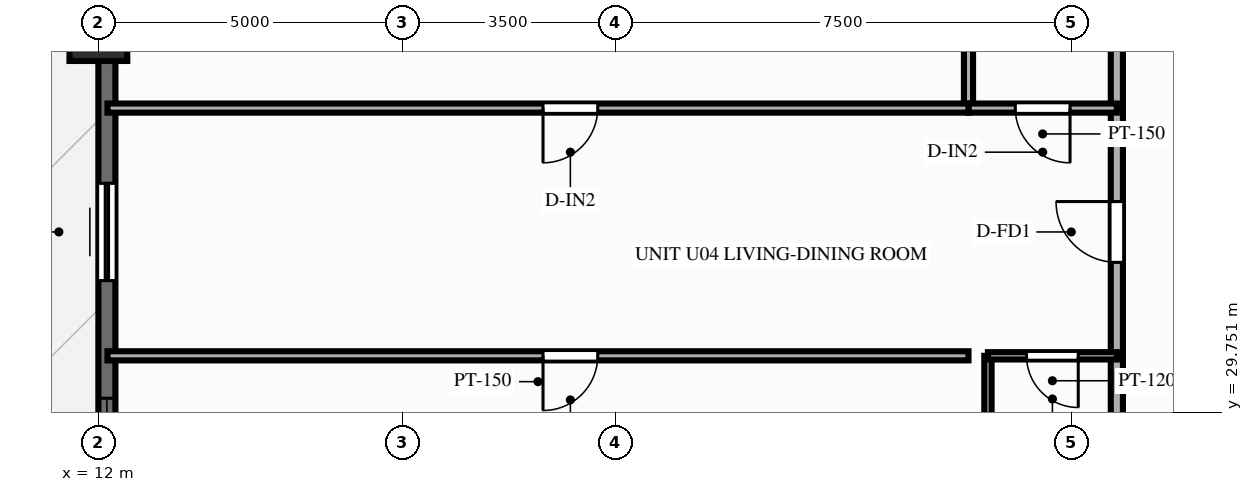
"""IFC4 building model, lengths in metres.
Left out: names, types, materials, properties, quantities, classifications, styles, units other than length and angle.
Written with IfcOpenShell. Run it as: python <this file> out.ifc"""

import sys

from ifc_helpers import new_model, si_unit, direction, frame, frame_2d, origin, origin_2d, place, context, subcontext, project, spatial, rectangle, extrude, source, transform, mapped, element, fill, save


model = new_model("IFC4")
c1 = context("Model", 3, precision=1e-05, world=origin(), true_north=direction((0.0, 1.0)))
c2 = subcontext(c1, "Body", "Model", "MODEL_VIEW")
j1 = project(units=[si_unit("LENGTHUNIT", "METRE"), si_unit("PLANEANGLEUNIT", "RADIAN")], contexts=[c1])
p1 = place(None, origin())
s1 = spatial("IfcSite", under=j1, at=p1, CompositionType="ELEMENT")
p2 = place(p1, origin())
s2 = spatial("IfcBuilding", under=s1, at=p2, CompositionType="ELEMENT")
p3 = place(p2, frame((0.0, 0.0, 141.75)))
s3 = spatial("IfcBuildingStorey", under=s2, at=p3, CompositionType="ELEMENT", Elevation=141.75)
m1 = source(origin(), c2, "Body", "SweptSolid", [
    extrude(rectangle(XDim=0.95, YDim=0.95, at=origin_2d()), origin(), (0.0, 0.0, 1.0), 3.0),
])
p4 = place(p3, frame((12.0, 36.0, 0.0), z_axis=(0.0, 0.0, 1.0), x_axis=(1.0, 0.0, 0.0)))
e1 = element("IfcColumn", 1, at=p4, inside=s3, PredefinedType="COLUMN", context=c2, shape_type="MappedRepresentation", body=[
    mapped(m1, transform((0.0, 0.0, 0.0), scale=1.0)),
])
p5 = place(p3, frame((12.14, 7.2, 0.0), z_axis=(0.0, 0.0, 1.0), x_axis=(0.0, 1.0, 0.0)))
e2 = element("IfcWall", 2, at=p5, inside=s3, PredefinedType="SOLIDWALL", context=c2, shape_type="SweptSolid", body=[
    extrude(rectangle(XDim=39.6, YDim=0.28, at=frame_2d((19.8, 0.0))), origin(), (0.0, 0.0, 1.0), 2.28),
])
p6 = place(p5, frame((0.945, 0.0, 0.25)))
e3 = element("IfcOpeningElement", 3, at=p6, cuts=e2, PredefinedType="OPENING", context=c2, shape_type="SweptSolid", body=[
    extrude(rectangle(XDim=1.2, YDim=1.5, at=frame_2d((0.6, 0.75))), frame((0.0, 0.152, 0.0), z_axis=(0.0, -1.0, 0.0), x_axis=(1.0, 0.0, 0.0)), (0.0, 0.0, 1.0), 0.304),
])
p7 = place(p5, frame((4.213, 0.0, 0.25)))
e4 = element("IfcOpeningElement", 4, at=p7, cuts=e2, PredefinedType="OPENING", context=c2, shape_type="SweptSolid", body=[
    extrude(rectangle(XDim=1.2, YDim=1.5, at=frame_2d((0.6, 0.75))), frame((0.0, 0.152, 0.0), z_axis=(0.0, -1.0, 0.0), x_axis=(1.0, 0.0, 0.0)), (0.0, 0.0, 1.0), 0.304),
])
p8 = place(p5, frame((7.55, 0.0, 0.25)))
e5 = element("IfcOpeningElement", 5, at=p8, cuts=e2, PredefinedType="OPENING", context=c2, shape_type="SweptSolid", body=[
    extrude(rectangle(XDim=1.2, YDim=1.5, at=frame_2d((0.6, 0.75))), frame((0.0, 0.152, 0.0), z_axis=(0.0, -1.0, 0.0), x_axis=(1.0, 0.0, 0.0)), (0.0, 0.0, 1.0), 0.304),
])
p9 = place(p5, frame((13.483, 0.0, 0.25)))
e6 = element("IfcOpeningElement", 6, at=p9, cuts=e2, PredefinedType="OPENING", context=c2, shape_type="SweptSolid", body=[
    extrude(rectangle(XDim=1.2, YDim=1.5, at=frame_2d((0.6, 0.75))), frame((0.0, 0.152, 0.0), z_axis=(0.0, -1.0, 0.0), x_axis=(1.0, 0.0, 0.0)), (0.0, 0.0, 1.0), 0.304),
])
p10 = place(p5, frame((16.82, 0.0, 0.25)))
e7 = element("IfcOpeningElement", 7, at=p10, cuts=e2, PredefinedType="OPENING", context=c2, shape_type="SweptSolid", body=[
    extrude(rectangle(XDim=1.2, YDim=1.5, at=frame_2d((0.6, 0.75))), frame((0.0, 0.152, 0.0), z_axis=(0.0, -1.0, 0.0), x_axis=(1.0, 0.0, 0.0)), (0.0, 0.0, 1.0), 0.304),
])
p11 = place(p5, frame((19.2, 0.0, 0.25)))
e8 = element("IfcOpeningElement", 8, at=p11, cuts=e2, PredefinedType="OPENING", context=c2, shape_type="SweptSolid", body=[
    extrude(rectangle(XDim=1.2, YDim=1.5, at=frame_2d((0.6, 0.75))), frame((0.0, 0.152, 0.0), z_axis=(0.0, -1.0, 0.0), x_axis=(1.0, 0.0, 0.0)), (0.0, 0.0, 1.0), 0.304),
])
p12 = place(p5, frame((21.578, 0.0, 0.25)))
e9 = element("IfcOpeningElement", 9, at=p12, cuts=e2, PredefinedType="OPENING", context=c2, shape_type="SweptSolid", body=[
    extrude(rectangle(XDim=1.2, YDim=1.5, at=frame_2d((0.6, 0.75))), frame((0.0, 0.152, 0.0), z_axis=(0.0, -1.0, 0.0), x_axis=(1.0, 0.0, 0.0)), (0.0, 0.0, 1.0), 0.304),
])
p13 = place(p5, frame((24.713, 0.0, 0.0)))
e10 = element("IfcOpeningElement", 10, at=p13, cuts=e2, PredefinedType="OPENING", context=c2, shape_type="SweptSolid", body=[
    extrude(rectangle(XDim=1.6, YDim=2.15, at=frame_2d((0.8, 1.075))), frame((0.0, 0.152, 0.0), z_axis=(0.0, -1.0, 0.0), x_axis=(1.0, 0.0, 0.0)), (0.0, 0.0, 1.0), 0.304),
])
p14 = place(p5, frame((29.305, 0.0, 0.25)))
e11 = element("IfcOpeningElement", 11, at=p14, cuts=e2, PredefinedType="OPENING", context=c2, shape_type="SweptSolid", body=[
    extrude(rectangle(XDim=0.7, YDim=1.5, at=frame_2d((0.35, 0.75))), frame((0.0, 0.152, 0.0), z_axis=(0.0, -1.0, 0.0), x_axis=(1.0, 0.0, 0.0)), (0.0, 0.0, 1.0), 0.304),
])
p15 = place(p5, frame((30.848, 0.0, 0.25)))
e12 = element("IfcOpeningElement", 12, at=p15, cuts=e2, PredefinedType="OPENING", context=c2, shape_type="SweptSolid", body=[
    extrude(rectangle(XDim=1.2, YDim=1.5, at=frame_2d((0.6, 0.75))), frame((0.0, 0.152, 0.0), z_axis=(0.0, -1.0, 0.0), x_axis=(1.0, 0.0, 0.0)), (0.0, 0.0, 1.0), 0.304),
])
p16 = place(p5, frame((34.183, 0.0, 0.25)))
e13 = element("IfcOpeningElement", 13, at=p16, cuts=e2, PredefinedType="OPENING", context=c2, shape_type="SweptSolid", body=[
    extrude(rectangle(XDim=1.2, YDim=1.5, at=frame_2d((0.6, 0.75))), frame((0.0, 0.152, 0.0), z_axis=(0.0, -1.0, 0.0), x_axis=(1.0, 0.0, 0.0)), (0.0, 0.0, 1.0), 0.304),
])
p17 = place(p5, frame((37.452, 0.0, 0.25)))
e14 = element("IfcOpeningElement", 14, at=p17, cuts=e2, PredefinedType="OPENING", context=c2, shape_type="SweptSolid", body=[
    extrude(rectangle(XDim=1.2, YDim=1.5, at=frame_2d((0.6, 0.75))), frame((0.0, 0.152, 0.0), z_axis=(0.0, -1.0, 0.0), x_axis=(1.0, 0.0, 0.0)), (0.0, 0.0, 1.0), 0.304),
])
p18 = place(p3, frame((28.75, 28.08, 0.0), z_axis=(0.0, 0.0, 1.0), x_axis=(0.0, 1.0, 0.0)))
e15 = element("IfcWall", 15, at=p18, inside=s3, PredefinedType="PARTITIONING", context=c2, shape_type="SweptSolid", body=[
    extrude(rectangle(XDim=2.595, YDim=0.2, at=frame_2d((1.298, 0.0))), origin(), (0.0, 0.0, 1.0), 2.7),
])
p19 = place(p3, frame((28.75, 30.676, 0.0), z_axis=(0.0, 0.0, 1.0), x_axis=(0.0, 1.0, 0.0)))
e16 = element("IfcWall", 16, at=p19, inside=s3, PredefinedType="PARTITIONING", context=c2, shape_type="SweptSolid", body=[
    extrude(rectangle(XDim=4.074, YDim=0.2, at=frame_2d((2.037, 0.0))), origin(), (0.0, 0.0, 1.0), 2.7),
])
p20 = place(p19, frame((1.537, 0.0, 0.0)))
e17 = element("IfcOpeningElement", 17, at=p20, cuts=e16, PredefinedType="OPENING", context=c2, shape_type="SweptSolid", body=[
    extrude(rectangle(XDim=1.0, YDim=2.15, at=frame_2d((0.5, 1.075))), frame((0.0, 0.112, 0.0), z_axis=(0.0, -1.0, 0.0), x_axis=(1.0, 0.0, 0.0)), (0.0, 0.0, 1.0), 0.224),
])
p21 = place(p3, frame((28.75, 34.75, 0.0), z_axis=(0.0, 0.0, 1.0), x_axis=(0.0, 1.0, 0.0)))
e18 = element("IfcWall", 18, at=p21, inside=s3, PredefinedType="PARTITIONING", context=c2, shape_type="SweptSolid", body=[
    extrude(rectangle(XDim=2.6, YDim=0.2, at=frame_2d((1.3, 0.0))), origin(), (0.0, 0.0, 1.0), 2.7),
])
p22 = place(p3, frame((26.63, 28.08, 0.0), z_axis=(0.0, 0.0, 1.0), x_axis=(0.0, 1.0, 0.0)))
e19 = element("IfcWall", 19, at=p22, inside=s3, PredefinedType="PARTITIONING", context=c2, shape_type="SweptSolid", body=[
    extrude(rectangle(XDim=2.595, YDim=0.12, at=frame_2d((1.298, 0.0))), origin(), (0.0, 0.0, 1.0), 2.7),
])
p23 = place(p3, frame((26.31, 34.75, 0.0), z_axis=(0.0, 0.0, 1.0), x_axis=(0.0, 1.0, 0.0)))
e20 = element("IfcWall", 20, at=p23, inside=s3, PredefinedType="PARTITIONING", context=c2, shape_type="SweptSolid", body=[
    extrude(rectangle(XDim=2.6, YDim=0.15, at=frame_2d((1.3, 0.0))), origin(), (0.0, 0.0, 1.0), 2.7),
])
p24 = place(p3, frame((28.75, 30.676, 0.0), z_axis=(0.0, 0.0, 1.0), x_axis=(-1.0, 0.0, 0.0)))
e21 = element("IfcWall", 21, at=p24, inside=s3, PredefinedType="PARTITIONING", context=c2, shape_type="SweptSolid", body=[
    extrude(rectangle(XDim=2.12, YDim=0.12, at=frame_2d((1.06, 0.0))), origin(), (0.0, 0.0, 1.0), 2.7),
])
p25 = place(p24, frame((0.635, 0.0, 0.0)))
e22 = element("IfcOpeningElement", 22, at=p25, cuts=e21, PredefinedType="OPENING", context=c2, shape_type="SweptSolid", body=[
    extrude(rectangle(XDim=0.85, YDim=2.05, at=frame_2d((0.425, 1.025))), frame((0.0, 0.072, 0.0), z_axis=(0.0, -1.0, 0.0), x_axis=(1.0, 0.0, 0.0)), (0.0, 0.0, 1.0), 0.144),
])
p26 = place(p3, frame((26.31, 30.676, 0.0), z_axis=(0.0, 0.0, 1.0), x_axis=(-1.0, 0.0, 0.0)))
e23 = element("IfcWall", 23, at=p26, inside=s3, PredefinedType="PARTITIONING", context=c2, shape_type="SweptSolid", body=[
    extrude(rectangle(XDim=14.16, YDim=0.15, at=frame_2d((7.08, 0.0))), origin(), (0.0, 0.0, 1.0), 2.7),
])
p27 = place(p26, frame((6.097, 0.0, 0.0)))
e24 = element("IfcOpeningElement", 24, at=p27, cuts=e23, PredefinedType="OPENING", context=c2, shape_type="SweptSolid", body=[
    extrude(rectangle(XDim=0.9, YDim=2.1, at=frame_2d((0.45, 1.05))), frame((0.0, 0.087, 0.0), z_axis=(0.0, -1.0, 0.0), x_axis=(1.0, 0.0, 0.0)), (0.0, 0.0, 1.0), 0.174),
])
p28 = place(p3, frame((28.75, 34.75, 0.0), z_axis=(0.0, 0.0, 1.0), x_axis=(-1.0, 0.0, 0.0)))
e25 = element("IfcWall", 25, at=p28, inside=s3, PredefinedType="PARTITIONING", context=c2, shape_type="SweptSolid", body=[
    extrude(rectangle(XDim=2.44, YDim=0.15, at=frame_2d((1.22, 0.0))), origin(), (0.0, 0.0, 1.0), 2.7),
])
p29 = place(p28, frame((0.77, 0.0, 0.0)))
e26 = element("IfcOpeningElement", 26, at=p29, cuts=e25, PredefinedType="OPENING", context=c2, shape_type="SweptSolid", body=[
    extrude(rectangle(XDim=0.9, YDim=2.1, at=frame_2d((0.45, 1.05))), frame((0.0, 0.087, 0.0), z_axis=(0.0, -1.0, 0.0), x_axis=(1.0, 0.0, 0.0)), (0.0, 0.0, 1.0), 0.174),
])
p30 = place(p3, frame((26.31, 34.75, 0.0), z_axis=(0.0, 0.0, 1.0), x_axis=(-1.0, 0.0, 0.0)))
e27 = element("IfcWall", 27, at=p30, inside=s3, PredefinedType="PARTITIONING", context=c2, shape_type="SweptSolid", body=[
    extrude(rectangle(XDim=14.16, YDim=0.15, at=frame_2d((7.08, 0.0))), origin(), (0.0, 0.0, 1.0), 2.7),
])
p31 = place(p30, frame((6.097, 0.0, 0.0)))
e28 = element("IfcOpeningElement", 28, at=p31, cuts=e27, PredefinedType="OPENING", context=c2, shape_type="SweptSolid", body=[
    extrude(rectangle(XDim=0.9, YDim=2.1, at=frame_2d((0.45, 1.05))), frame((0.0, 0.087, 0.0), z_axis=(0.0, -1.0, 0.0), x_axis=(1.0, 0.0, 0.0)), (0.0, 0.0, 1.0), 0.174),
])
m2 = source(origin(), c2, "Body", "SweptSolid", [
    extrude(rectangle(XDim=1.2, YDim=1.5, at=frame_2d((0.6, 0.75))), frame((0.0, 0.03, 0.0), z_axis=(0.0, -1.0, 0.0), x_axis=(1.0, 0.0, 0.0)), (0.0, 0.0, 1.0), 0.06),
])
p32 = place(p12, origin())
e29 = element("IfcWindow", 29, at=p32, inside=s3, PartitioningType="SINGLE_PANEL", PredefinedType="WINDOW", context=c2, shape_type="MappedRepresentation", body=[
    mapped(m2, transform((0.0, 0.0, 0.0), scale=1.0)),
])
fill(e9, e29)
m3 = source(origin(), c2, "Body", "SweptSolid", [
    extrude(rectangle(XDim=1.6, YDim=2.15, at=frame_2d((0.8, 1.075))), frame((0.0, 0.025, 0.0), z_axis=(0.0, -1.0, 0.0), x_axis=(1.0, 0.0, 0.0)), (0.0, 0.0, 1.0), 0.05),
])
p33 = place(p13, origin())
e30 = element("IfcDoor", 30, at=p33, inside=s3, OperationType="SLIDING_TO_LEFT", PredefinedType="DOOR", context=c2, shape_type="MappedRepresentation", body=[
    mapped(m3, transform((0.0, 0.0, 0.0), scale=1.0)),
])
fill(e10, e30)
m4 = source(origin(), c2, "Body", "SweptSolid", [
    extrude(rectangle(XDim=1.0, YDim=2.15, at=frame_2d((0.5, 1.075))), frame((0.0, 0.025, 0.0), z_axis=(0.0, -1.0, 0.0), x_axis=(1.0, 0.0, 0.0)), (0.0, 0.0, 1.0), 0.05),
])
p34 = place(p20, origin())
e31 = element("IfcDoor", 31, at=p34, inside=s3, OperationType="SINGLE_SWING_RIGHT", PredefinedType="DOOR", context=c2, shape_type="MappedRepresentation", body=[
    mapped(m4, transform((0.0, 0.0, 0.0), scale=1.0)),
])
fill(e17, e31)
m5 = source(origin(), c2, "Body", "SweptSolid", [
    extrude(rectangle(XDim=0.85, YDim=2.05, at=frame_2d((0.425, 1.025))), frame((0.0, 0.025, 0.0), z_axis=(0.0, -1.0, 0.0), x_axis=(1.0, 0.0, 0.0)), (0.0, 0.0, 1.0), 0.05),
])
p35 = place(p25, origin())
e32 = element("IfcDoor", 32, at=p35, inside=s3, OperationType="SINGLE_SWING_LEFT", PredefinedType="DOOR", context=c2, shape_type="MappedRepresentation", body=[
    mapped(m5, transform((0.0, 0.0, 0.0), scale=1.0)),
])
fill(e22, e32)
m6 = source(origin(), c2, "Body", "SweptSolid", [
    extrude(rectangle(XDim=0.9, YDim=2.1, at=frame_2d((0.45, 1.05))), frame((0.0, 0.025, 0.0), z_axis=(0.0, -1.0, 0.0), x_axis=(1.0, 0.0, 0.0)), (0.0, 0.0, 1.0), 0.05),
])
p36 = place(p27, origin())
e33 = element("IfcDoor", 33, at=p36, inside=s3, OperationType="SINGLE_SWING_RIGHT", PredefinedType="DOOR", context=c2, shape_type="MappedRepresentation", body=[
    mapped(m6, transform((0.0, 0.0, 0.0), scale=1.0)),
])
fill(e24, e33)
p37 = place(p29, origin())
e34 = element("IfcDoor", 34, at=p37, inside=s3, OperationType="SINGLE_SWING_LEFT", PredefinedType="DOOR", context=c2, shape_type="MappedRepresentation", body=[
    mapped(m6, transform((0.0, 0.0, 0.0), scale=1.0)),
])
fill(e26, e34)
p38 = place(p31, origin())
e35 = element("IfcDoor", 35, at=p38, inside=s3, OperationType="SINGLE_SWING_RIGHT", PredefinedType="DOOR", context=c2, shape_type="MappedRepresentation", body=[
    mapped(m6, transform((0.0, 0.0, 0.0), scale=1.0)),
])
fill(e28, e35)
save(model, sys.argv[1])
